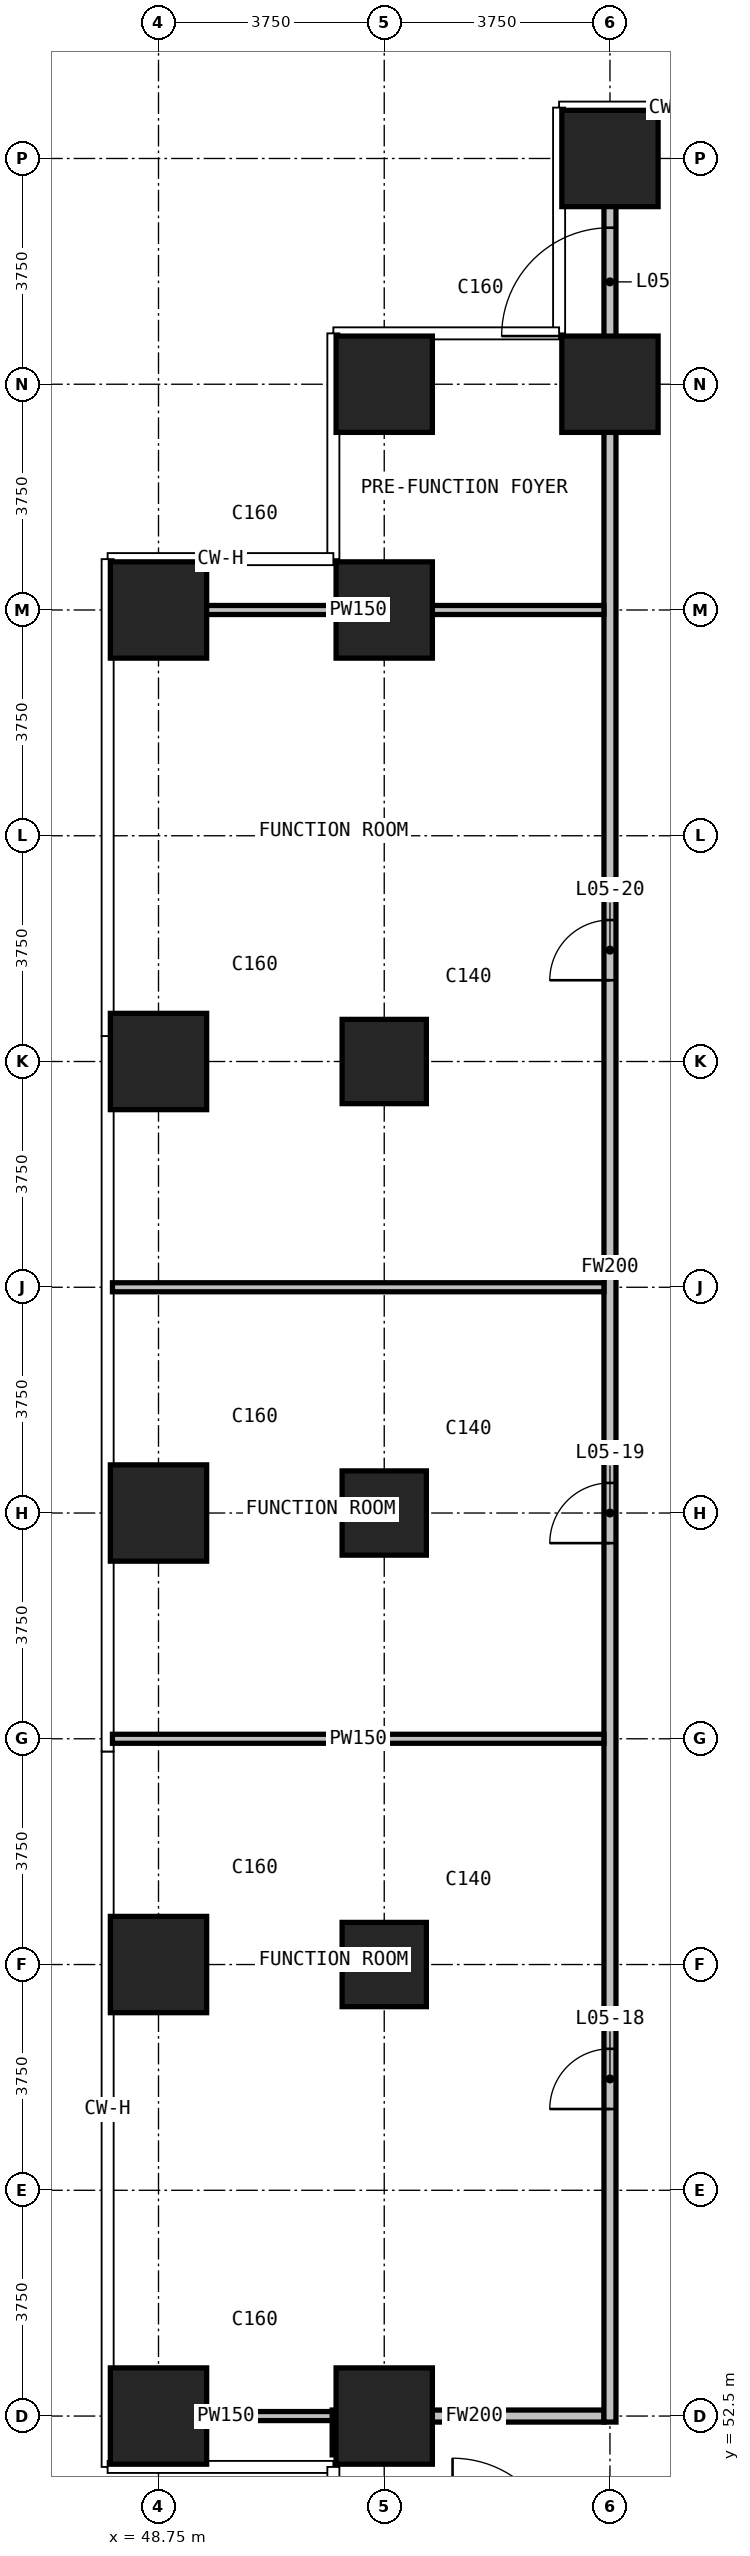
"""IFC4 building model, lengths in metres.
Left out: names, types, materials, properties, quantities, classifications, styles, units other than length and angle.
Written with IfcOpenShell. Run it as: python <this file> out.ifc"""

import sys

from ifc_helpers import new_model, si_unit, direction, frame, frame_2d, origin, origin_2d, place, context, subcontext, project, spatial, rectangle, extrude, element, fill, save


model = new_model("IFC4")
c1 = context("Model", 3, precision=1e-05, world=origin(), true_north=direction((0.0, 1.0)))
c2 = subcontext(c1, "Body", "Model", "MODEL_VIEW")
j1 = project(units=[si_unit("LENGTHUNIT", "METRE"), si_unit("PLANEANGLEUNIT", "RADIAN")], contexts=[c1])
p1 = place(None, origin())
s1 = spatial("IfcSite", under=j1, at=p1, CompositionType="ELEMENT")
p2 = place(p1, origin())
s2 = spatial("IfcBuilding", under=s1, at=p2, CompositionType="ELEMENT")
p3 = place(p2, frame((0.0, 0.0, 35.0)))
s3 = spatial("IfcBuildingStorey", under=s2, at=p3, CompositionType="ELEMENT", Elevation=35.0)
for number, where, z_axis, x_axis in (
    (1, (48.75, 52.5, 0.0), (0.0, 0.0, 1.0), (1.0, 0.0, 0.0)),
    (2, (48.75, 60.0, 0.0), (0.0, 0.0, 1.0), (1.0, 0.0, 0.0)),
    (3, (48.75, 67.5, 0.0), (0.0, 0.0, 1.0), (1.0, 0.0, 0.0)),
    (4, (48.75, 75.0, 0.0), (0.0, 0.0, 1.0), (1.0, 0.0, 0.0)),
    (5, (48.75, 82.5, 0.0), (0.0, 0.0, 1.0), (1.0, 0.0, 0.0)),
    (6, (52.5, 52.5, 0.0), (0.0, 0.0, 1.0), (1.0, 0.0, 0.0)),
):
    element("IfcColumn", number, at=place(p3, frame(where, z_axis=z_axis, x_axis=x_axis)), inside=s3, PredefinedType="COLUMN", context=c2, shape_type="SweptSolid", body=[
        extrude(rectangle(XDim=1.6, YDim=1.6, at=origin_2d()), origin(), (0.0, 0.0, 1.0), 4.5),
    ])
for number, where, z_axis, x_axis in (
    (7, (52.5, 60.0, 0.0), (0.0, 0.0, 1.0), (1.0, 0.0, 0.0)),
    (8, (52.5, 67.5, 0.0), (0.0, 0.0, 1.0), (1.0, 0.0, 0.0)),
    (9, (52.5, 75.0, 0.0), (0.0, 0.0, 1.0), (1.0, 0.0, 0.0)),
):
    element("IfcColumn", number, at=place(p3, frame(where, z_axis=z_axis, x_axis=x_axis)), inside=s3, PredefinedType="COLUMN", context=c2, shape_type="SweptSolid", body=[
        extrude(rectangle(XDim=1.4, YDim=1.4, at=origin_2d()), origin(), (0.0, 0.0, 1.0), 4.5),
    ])
for number, where, z_axis, x_axis in (
    (10, (52.5, 82.5, 0.0), (0.0, 0.0, 1.0), (1.0, 0.0, 0.0)),
    (11, (52.5, 86.25, 0.0), (0.0, 0.0, 1.0), (1.0, 0.0, 0.0)),
    (12, (56.25, 86.25, 0.0), (0.0, 0.0, 1.0), (1.0, 0.0, 0.0)),
    (13, (56.25, 90.0, 0.0), (0.0, 0.0, 1.0), (1.0, 0.0, 0.0)),
):
    element("IfcColumn", number, at=place(p3, frame(where, z_axis=z_axis, x_axis=x_axis)), inside=s3, PredefinedType="COLUMN", context=c2, shape_type="SweptSolid", body=[
        extrude(rectangle(XDim=1.6, YDim=1.6, at=origin_2d()), origin(), (0.0, 0.0, 1.0), 4.5),
    ])
p4 = place(p3, frame((51.835, 52.5, 0.0), z_axis=(0.0, 0.0, 1.0), x_axis=(1.0, 0.0, 0.0)))
e14 = element("IfcWall", 14, at=p4, inside=s3, PredefinedType="PARTITIONING", context=c2, shape_type="SweptSolid", body=[
    extrude(rectangle(XDim=4.315, YDim=0.2, at=frame_2d((2.157, 0.0))), origin(), (0.0, 0.0, 1.0), 4.2),
])
p5 = place(p3, frame((51.735, 51.855, 0.0), z_axis=(0.0, 0.0, 1.0), x_axis=(0.0, 1.0, 0.0)))
e15 = element("IfcWall", 15, at=p5, inside=s3, PredefinedType="PARTITIONING", context=c2, shape_type="SweptSolid", body=[
    extrude(rectangle(XDim=0.745, YDim=0.2, at=frame_2d((0.373, 0.0))), origin(), (0.0, 0.0, 1.0), 4.2),
])
p6 = place(p3, frame((56.25, 52.4, 0.0), z_axis=(0.0, 0.0, 1.0), x_axis=(0.0, 1.0, 0.0)))
e16 = element("IfcWall", 16, at=p6, inside=s3, PredefinedType="PARTITIONING", context=c2, shape_type="SweptSolid", body=[
    extrude(rectangle(XDim=38.365, YDim=0.2, at=frame_2d((19.183, 0.0))), origin(), (0.0, 0.0, 1.0), 4.2),
])
p7 = place(p6, frame((5.2, 0.0, 0.0)))
e17 = element("IfcOpeningElement", 17, at=p7, cuts=e16, PredefinedType="OPENING", context=c2, shape_type="SweptSolid", body=[
    extrude(rectangle(XDim=1.0, YDim=2.2, at=frame_2d((0.5, 1.1))), frame((0.0, 0.11, 0.0), z_axis=(0.0, -1.0, 0.0), x_axis=(1.0, 0.0, 0.0)), (0.0, 0.0, 1.0), 0.22),
])
p8 = place(p6, frame((14.6, 0.0, 0.0)))
e18 = element("IfcOpeningElement", 18, at=p8, cuts=e16, PredefinedType="OPENING", context=c2, shape_type="SweptSolid", body=[
    extrude(rectangle(XDim=1.0, YDim=2.2, at=frame_2d((0.5, 1.1))), frame((0.0, 0.11, 0.0), z_axis=(0.0, -1.0, 0.0), x_axis=(1.0, 0.0, 0.0)), (0.0, 0.0, 1.0), 0.22),
])
p9 = place(p6, frame((23.95, 0.0, 0.0)))
e19 = element("IfcOpeningElement", 19, at=p9, cuts=e16, PredefinedType="OPENING", context=c2, shape_type="SweptSolid", body=[
    extrude(rectangle(XDim=1.0, YDim=2.2, at=frame_2d((0.5, 1.1))), frame((0.0, 0.11, 0.0), z_axis=(0.0, -1.0, 0.0), x_axis=(1.0, 0.0, 0.0)), (0.0, 0.0, 1.0), 0.22),
])
p10 = place(p6, frame((34.65, 0.0, 0.0)))
e20 = element("IfcOpeningElement", 20, at=p10, cuts=e16, PredefinedType="OPENING", context=c2, shape_type="SweptSolid", body=[
    extrude(rectangle(XDim=1.8, YDim=2.2, at=frame_2d((0.9, 1.1))), frame((0.0, 0.11, 0.0), z_axis=(0.0, -1.0, 0.0), x_axis=(1.0, 0.0, 0.0)), (0.0, 0.0, 1.0), 0.22),
])
p11 = place(p3, frame((48.105, 52.5, 0.0), z_axis=(0.0, 0.0, 1.0), x_axis=(1.0, 0.0, 0.0)))
e21 = element("IfcWall", 21, at=p11, inside=s3, PredefinedType="PARTITIONING", context=c2, shape_type="SweptSolid", body=[
    extrude(rectangle(XDim=3.53, YDim=0.15, at=frame_2d((1.765, 0.0))), origin(), (0.0, 0.0, 1.0), 4.2),
])
for number, where, z_axis, x_axis in (
    (22, (47.985, 63.75, 0.0), (0.0, 0.0, 1.0), (1.0, 0.0, 0.0)),
    (23, (47.985, 71.25, 0.0), (0.0, 0.0, 1.0), (1.0, 0.0, 0.0)),
    (24, (47.985, 82.5, 0.0), (0.0, 0.0, 1.0), (1.0, 0.0, 0.0)),
):
    element("IfcWall", number, at=place(p3, frame(where, z_axis=z_axis, x_axis=x_axis)), inside=s3, PredefinedType="PARTITIONING", context=c2, shape_type="SweptSolid", body=[
        extrude(rectangle(XDim=8.165, YDim=0.15, at=frame_2d((4.083, 0.0))), origin(), (0.0, 0.0, 1.0), 4.2),
    ])
p12 = place(p7, origin())
e25 = element("IfcDoor", 25, at=p12, inside=s3, OperationType="SINGLE_SWING_RIGHT", PredefinedType="DOOR", context=c2, shape_type="SweptSolid", body=[
    extrude(rectangle(XDim=1.0, YDim=2.2, at=frame_2d((0.5, 1.1))), frame((0.0, 0.025, 0.0), z_axis=(0.0, -1.0, 0.0), x_axis=(1.0, 0.0, 0.0)), (0.0, 0.0, 1.0), 0.05),
])
fill(e17, e25)
p13 = place(p8, origin())
e26 = element("IfcDoor", 26, at=p13, inside=s3, OperationType="SINGLE_SWING_LEFT", PredefinedType="DOOR", context=c2, shape_type="SweptSolid", body=[
    extrude(rectangle(XDim=1.0, YDim=2.2, at=frame_2d((0.5, 1.1))), frame((0.0, 0.025, 0.0), z_axis=(0.0, -1.0, 0.0), x_axis=(1.0, 0.0, 0.0)), (0.0, 0.0, 1.0), 0.05),
])
fill(e18, e26)
p14 = place(p9, origin())
e27 = element("IfcDoor", 27, at=p14, inside=s3, OperationType="SINGLE_SWING_RIGHT", PredefinedType="DOOR", context=c2, shape_type="SweptSolid", body=[
    extrude(rectangle(XDim=1.0, YDim=2.2, at=frame_2d((0.5, 1.1))), frame((0.0, 0.025, 0.0), z_axis=(0.0, -1.0, 0.0), x_axis=(1.0, 0.0, 0.0)), (0.0, 0.0, 1.0), 0.05),
])
fill(e19, e27)
p15 = place(p10, origin())
e28 = element("IfcDoor", 28, at=p15, inside=s3, OperationType="DOUBLE_DOOR_SINGLE_SWING", PredefinedType="DOOR", context=c2, shape_type="SweptSolid", body=[
    extrude(rectangle(XDim=1.8, YDim=2.2, at=frame_2d((0.9, 1.1))), frame((0.0, 0.025, 0.0), z_axis=(0.0, -1.0, 0.0), x_axis=(1.0, 0.0, 0.0)), (0.0, 0.0, 1.0), 0.05),
])
fill(e20, e28)
save(model, sys.argv[1])
